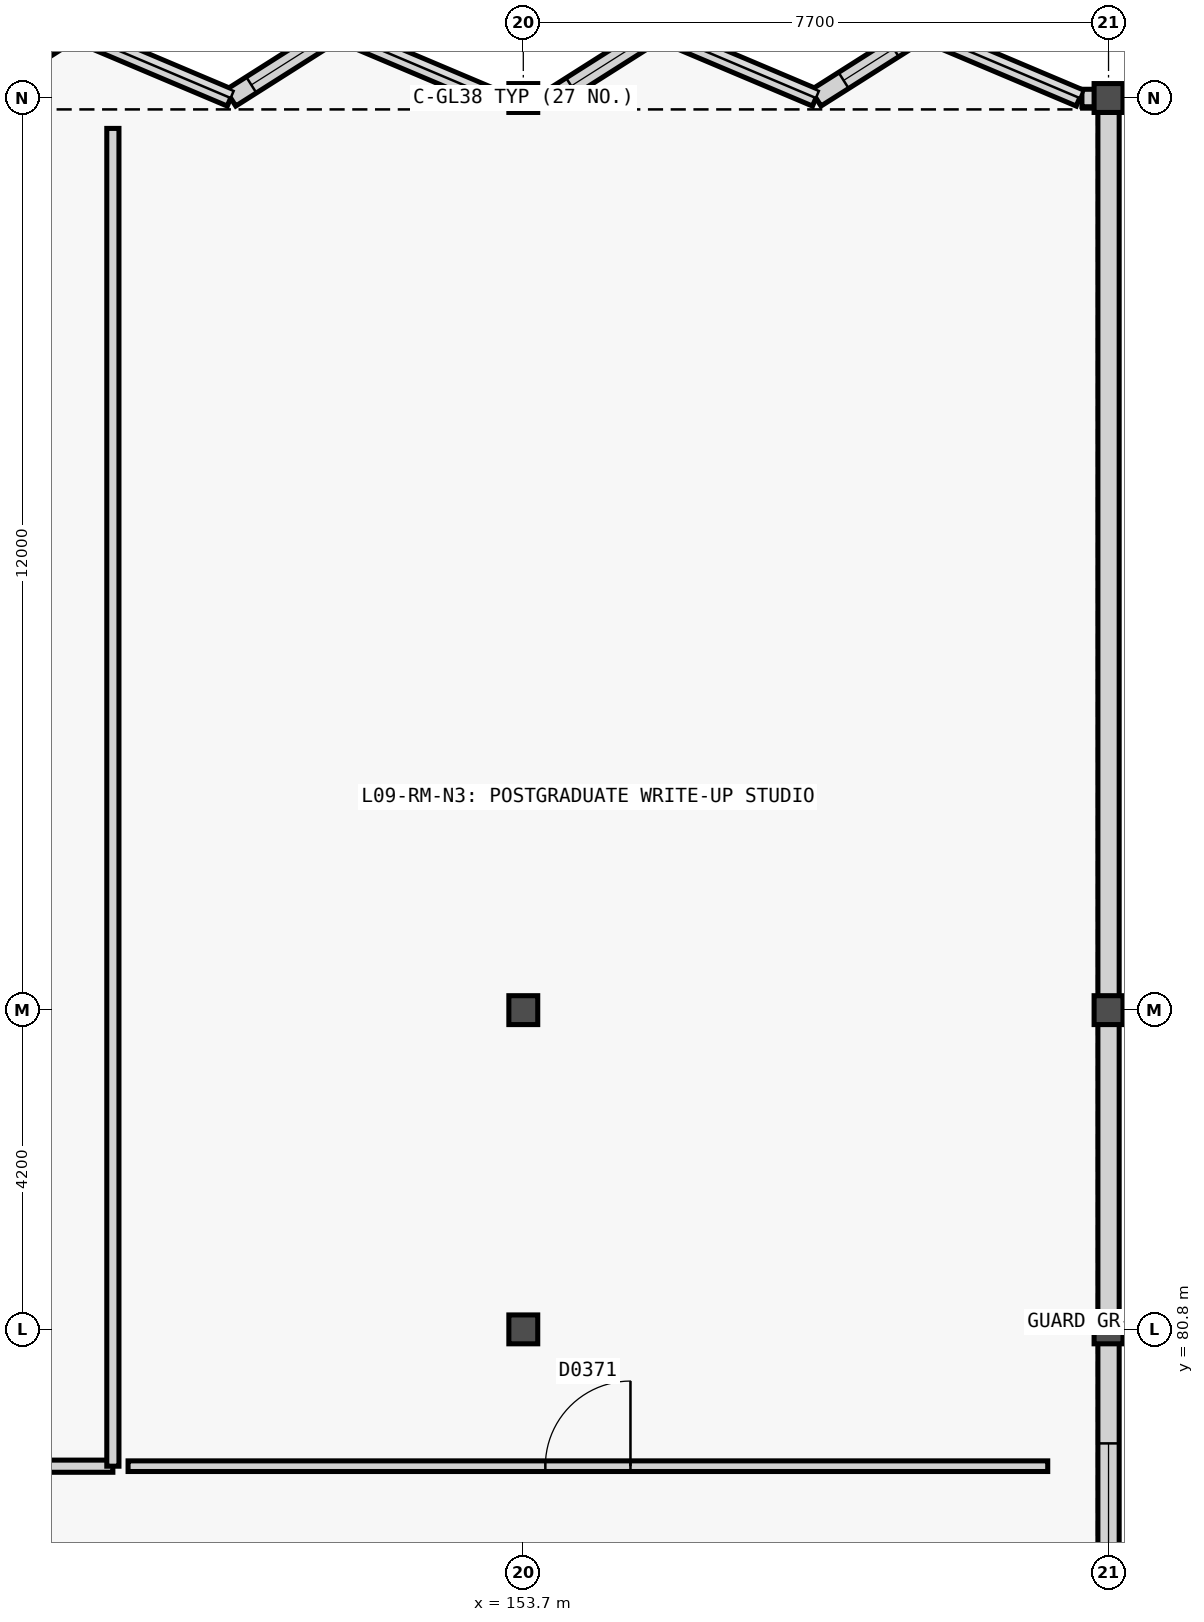
"""IFC4 building model, lengths in metres.
Left out: names, types, materials, properties, quantities, classifications, styles, units other than length and angle.
Written with IfcOpenShell. Run it as: python <this file> out.ifc"""

import sys

from ifc_helpers import new_model, si_unit, direction, frame, frame_2d, origin, origin_2d, place, context, subcontext, project, spatial, rectangle, extrude, element, fill, save


model = new_model("IFC4")
c1 = context("Model", 3, precision=1e-05, world=origin(), true_north=direction((0.0, 1.0)))
c2 = subcontext(c1, "Body", "Model", "MODEL_VIEW")
j1 = project(units=[si_unit("LENGTHUNIT", "METRE"), si_unit("PLANEANGLEUNIT", "RADIAN")], contexts=[c1])
p1 = place(None, origin())
s1 = spatial("IfcSite", under=j1, at=p1, CompositionType="ELEMENT")
p2 = place(p1, origin())
s2 = spatial("IfcBuilding", under=s1, at=p2, CompositionType="ELEMENT")
p3 = place(p2, frame((0.0, 0.0, 36.0)))
s3 = spatial("IfcBuildingStorey", under=s2, at=p3, CompositionType="ELEMENT", Elevation=36.0)
for number, where, z_axis, x_axis in (
    (1, (153.7, 80.8, 0.0), (0.0, 0.0, 1.0), (1.0, 0.0, 0.0)),
    (2, (153.7, 85.0, 0.0), (0.0, 0.0, 1.0), (1.0, 0.0, 0.0)),
    (3, (153.7, 97.0, 0.0), (0.0, 0.0, 1.0), (1.0, 0.0, 0.0)),
    (4, (161.4, 80.8, 0.0), (0.0, 0.0, 1.0), (1.0, 0.0, 0.0)),
    (5, (161.4, 85.0, 0.0), (0.0, 0.0, 1.0), (1.0, 0.0, 0.0)),
    (6, (161.4, 97.0, 0.0), (0.0, 0.0, 1.0), (1.0, 0.0, 0.0)),
):
    element("IfcColumn", number, at=place(p3, frame(where, z_axis=z_axis, x_axis=x_axis)), inside=s3, PredefinedType="COLUMN", context=c2, shape_type="SweptSolid", body=[
        extrude(rectangle(XDim=0.38, YDim=0.38, at=origin_2d()), origin(), (0.0, 0.0, 1.0), 3.6),
    ])
p4 = place(p3, frame((161.4, 96.812, 0.0), z_axis=(0.0, 0.0, 1.0), x_axis=(0.0, -1.0, 0.0)))
e7 = element("IfcWall", 7, at=p4, inside=s3, PredefinedType="SOLIDWALL", context=c2, shape_type="SweptSolid", body=[
    extrude(rectangle(XDim=32.624, YDim=0.28, at=frame_2d((16.312, 0.0))), origin(), (0.0, 0.0, 1.0), 2.8),
])
p5 = place(p4, frame((17.512, 0.0, 0.82)))
e8 = element("IfcOpeningElement", 8, at=p5, cuts=e7, PredefinedType="OPENING", context=c2, shape_type="SweptSolid", body=[
    extrude(rectangle(XDim=4.4, YDim=1.65, at=frame_2d((2.2, 0.825))), frame((0.0, 0.15, 0.0), z_axis=(0.0, -1.0, 0.0), x_axis=(1.0, 0.0, 0.0)), (0.0, 0.0, 1.0), 0.3),
])
p6 = place(p3, frame((153.35, 97.0, 0.0), z_axis=(0.0, 0.0, 1.0), x_axis=(1.0, 0.0, 0.0)))
e9 = element("IfcWall", 9, at=p6, inside=s3, PredefinedType="SOLIDWALL", context=c2, shape_type="SweptSolid", body=[
    extrude(rectangle(XDim=0.35, YDim=0.23, at=frame_2d((0.175, 0.0))), origin(), (0.0, 0.0, 1.0), 3.36),
])
p7 = place(p3, frame((153.7, 97.0, 0.0), z_axis=(0.0, 0.0, 1.0), x_axis=(1.0, 0.0, 0.0)))
e10 = element("IfcWall", 10, at=p7, inside=s3, PredefinedType="SOLIDWALL", context=c2, shape_type="SweptSolid", body=[
    extrude(rectangle(XDim=0.35, YDim=0.23, at=frame_2d((0.175, 0.0))), origin(), (0.0, 0.0, 1.0), 3.36),
])
p8 = place(p3, frame((161.05, 97.0, 0.0), z_axis=(0.0, 0.0, 1.0), x_axis=(1.0, 0.0, 0.0)))
e11 = element("IfcWall", 11, at=p8, inside=s3, PredefinedType="SOLIDWALL", context=c2, shape_type="SweptSolid", body=[
    extrude(rectangle(XDim=0.35, YDim=0.23, at=frame_2d((0.175, 0.0))), origin(), (0.0, 0.0, 1.0), 3.36),
])
p9 = place(p3, frame((146.38, 97.0, 0.0), z_axis=(0.0, 0.0, 1.0), x_axis=(0.844626536799, 0.535355968805, 0.0)))
e12 = element("IfcWall", 12, at=p9, inside=s3, PredefinedType="SOLIDWALL", context=c2, shape_type="SweptSolid", body=[
    extrude(rectangle(XDim=1.644, YDim=0.25, at=frame_2d((0.822, 0.0))), origin(), (0.0, 0.0, 1.0), 3.36),
])
p10 = place(p9, frame((0.347, 0.0, 0.82)))
e13 = element("IfcOpeningElement", 13, at=p10, cuts=e12, PredefinedType="OPENING", context=c2, shape_type="SweptSolid", body=[
    extrude(rectangle(XDim=0.95, YDim=1.5, at=frame_2d((0.475, 0.75))), frame((0.0, 0.135, 0.0), z_axis=(0.0, -1.0, 0.0), x_axis=(1.0, 0.0, 0.0)), (0.0, 0.0, 1.0), 0.27),
])
p11 = place(p3, frame((147.768, 97.88, 0.0), z_axis=(0.0, 0.0, 1.0), x_axis=(0.921122216024, -0.389273506866, 0.0)))
e14 = element("IfcWall", 14, at=p11, inside=s3, PredefinedType="SOLIDWALL", context=c2, shape_type="SweptSolid", body=[
    extrude(rectangle(XDim=2.26, YDim=0.23, at=frame_2d((1.13, 0.0))), origin(), (0.0, 0.0, 1.0), 3.36),
])
p12 = place(p3, frame((149.85, 97.0, 0.0), z_axis=(0.0, 0.0, 1.0), x_axis=(0.844583954912, 0.535423143976, 0.0)))
e15 = element("IfcWall", 15, at=p12, inside=s3, PredefinedType="SOLIDWALL", context=c2, shape_type="SweptSolid", body=[
    extrude(rectangle(XDim=1.643, YDim=0.25, at=frame_2d((0.822, 0.0))), origin(), (0.0, 0.0, 1.0), 3.36),
])
p13 = place(p12, frame((0.322, 0.0, 0.82)))
e16 = element("IfcOpeningElement", 16, at=p13, cuts=e15, PredefinedType="OPENING", context=c2, shape_type="SweptSolid", body=[
    extrude(rectangle(XDim=1.0, YDim=1.35, at=frame_2d((0.5, 0.675))), frame((0.0, 0.135, 0.0), z_axis=(0.0, -1.0, 0.0), x_axis=(1.0, 0.0, 0.0)), (0.0, 0.0, 1.0), 0.27),
])
p14 = place(p3, frame((151.238, 97.88, 0.0), z_axis=(0.0, 0.0, 1.0), x_axis=(0.921122216024, -0.389273506866, 0.0)))
e17 = element("IfcWall", 17, at=p14, inside=s3, PredefinedType="SOLIDWALL", context=c2, shape_type="SweptSolid", body=[
    extrude(rectangle(XDim=2.26, YDim=0.23, at=frame_2d((1.13, 0.0))), origin(), (0.0, 0.0, 1.0), 3.36),
])
p15 = place(p3, frame((154.08, 97.0, 0.0), z_axis=(0.0, 0.0, 1.0), x_axis=(0.844583954912, 0.535423143976, 0.0)))
e18 = element("IfcWall", 18, at=p15, inside=s3, PredefinedType="SOLIDWALL", context=c2, shape_type="SweptSolid", body=[
    extrude(rectangle(XDim=1.643, YDim=0.25, at=frame_2d((0.822, 0.0))), origin(), (0.0, 0.0, 1.0), 3.36),
])
p16 = place(p15, frame((0.297, 0.0, 0.82)))
e19 = element("IfcOpeningElement", 19, at=p16, cuts=e18, PredefinedType="OPENING", context=c2, shape_type="SweptSolid", body=[
    extrude(rectangle(XDim=1.05, YDim=1.4, at=frame_2d((0.525, 0.7))), frame((0.0, 0.135, 0.0), z_axis=(0.0, -1.0, 0.0), x_axis=(1.0, 0.0, 0.0)), (0.0, 0.0, 1.0), 0.27),
])
p17 = place(p3, frame((155.468, 97.88, 0.0), z_axis=(0.0, 0.0, 1.0), x_axis=(0.921122216024, -0.389273506866, 0.0)))
e20 = element("IfcWall", 20, at=p17, inside=s3, PredefinedType="SOLIDWALL", context=c2, shape_type="SweptSolid", body=[
    extrude(rectangle(XDim=2.26, YDim=0.23, at=frame_2d((1.13, 0.0))), origin(), (0.0, 0.0, 1.0), 3.36),
])
p18 = place(p3, frame((157.55, 97.0, 0.0), z_axis=(0.0, 0.0, 1.0), x_axis=(0.844583954912, 0.535423143976, 0.0)))
e21 = element("IfcWall", 21, at=p18, inside=s3, PredefinedType="SOLIDWALL", context=c2, shape_type="SweptSolid", body=[
    extrude(rectangle(XDim=1.643, YDim=0.25, at=frame_2d((0.822, 0.0))), origin(), (0.0, 0.0, 1.0), 3.36),
])
p19 = place(p18, frame((0.432, 0.0, 0.82)))
e22 = element("IfcOpeningElement", 22, at=p19, cuts=e21, PredefinedType="OPENING", context=c2, shape_type="SweptSolid", body=[
    extrude(rectangle(XDim=0.78, YDim=1.3, at=frame_2d((0.39, 0.65))), frame((0.0, 0.135, 0.0), z_axis=(0.0, -1.0, 0.0), x_axis=(1.0, 0.0, 0.0)), (0.0, 0.0, 1.0), 0.27),
])
p20 = place(p3, frame((158.938, 97.88, 0.0), z_axis=(0.0, 0.0, 1.0), x_axis=(0.921122216024, -0.389273506866, 0.0)))
e23 = element("IfcWall", 23, at=p20, inside=s3, PredefinedType="SOLIDWALL", context=c2, shape_type="SweptSolid", body=[
    extrude(rectangle(XDim=2.26, YDim=0.23, at=frame_2d((1.13, 0.0))), origin(), (0.0, 0.0, 1.0), 3.36),
])
p21 = place(p3, frame((135.5, 79.0, 0.0), z_axis=(0.0, 0.0, 1.0), x_axis=(1.0, 0.0, 0.0)))
e24 = element("IfcWall", 24, at=p21, inside=s3, PredefinedType="PARTITIONING", context=c2, shape_type="SweptSolid", body=[
    extrude(rectangle(XDim=12.8, YDim=0.16, at=frame_2d((6.4, 0.0))), origin(), (0.0, 0.0, 1.0), 3.34),
])
p22 = place(p21, frame((5.6, 0.0, 0.0)))
e25 = element("IfcOpeningElement", 25, at=p22, cuts=e24, PredefinedType="OPENING", context=c2, shape_type="SweptSolid", body=[
    extrude(rectangle(XDim=1.6, YDim=2.2, at=frame_2d((0.8, 1.1))), frame((0.0, 0.09, 0.0), z_axis=(0.0, -1.0, 0.0), x_axis=(1.0, 0.0, 0.0)), (0.0, 0.0, 1.0), 0.18),
])
p23 = place(p3, frame((148.3, 79.0, 0.0), z_axis=(0.0, 0.0, 1.0), x_axis=(0.0, 1.0, 0.0)))
e26 = element("IfcWall", 26, at=p23, inside=s3, PredefinedType="PARTITIONING", context=c2, shape_type="SweptSolid", body=[
    extrude(rectangle(XDim=17.6, YDim=0.16, at=frame_2d((8.8, 0.0))), origin(), (0.0, 0.0, 1.0), 3.34),
])
p24 = place(p3, frame((148.5, 79.0, 0.0), z_axis=(0.0, 0.0, 1.0), x_axis=(1.0, 0.0, 0.0)))
e27 = element("IfcWall", 27, at=p24, inside=s3, PredefinedType="PARTITIONING", context=c2, shape_type="SweptSolid", body=[
    extrude(rectangle(XDim=12.1, YDim=0.14, at=frame_2d((6.05, 0.0))), origin(), (0.0, 0.0, 1.0), 3.34),
])
p25 = place(p24, frame((5.49, 0.0, 0.0)))
e28 = element("IfcOpeningElement", 28, at=p25, cuts=e27, PredefinedType="OPENING", context=c2, shape_type="SweptSolid", body=[
    extrude(rectangle(XDim=1.12, YDim=2.15, at=frame_2d((0.56, 1.075))), frame((0.0, 0.08, 0.0), z_axis=(0.0, -1.0, 0.0), x_axis=(1.0, 0.0, 0.0)), (0.0, 0.0, 1.0), 0.16),
])
p26 = place(p5, origin())
e29 = element("IfcWindow", 29, at=p26, inside=s3, PartitioningType="SINGLE_PANEL", PredefinedType="WINDOW", context=c2, shape_type="SweptSolid", body=[
    extrude(rectangle(XDim=4.4, YDim=1.65, at=frame_2d((2.2, 0.825))), frame((0.0, 0.03, 0.0), z_axis=(0.0, -1.0, 0.0), x_axis=(1.0, 0.0, 0.0)), (0.0, 0.0, 1.0), 0.06),
])
fill(e8, e29)
p27 = place(p13, origin())
e30 = element("IfcWindow", 30, at=p27, inside=s3, PartitioningType="SINGLE_PANEL", PredefinedType="WINDOW", context=c2, shape_type="SweptSolid", body=[
    extrude(rectangle(XDim=1.0, YDim=1.35, at=frame_2d((0.5, 0.675))), frame((0.0, 0.03, 0.0), z_axis=(0.0, -1.0, 0.0), x_axis=(1.0, 0.0, 0.0)), (0.0, 0.0, 1.0), 0.06),
])
fill(e16, e30)
p28 = place(p16, origin())
e31 = element("IfcWindow", 31, at=p28, inside=s3, PartitioningType="SINGLE_PANEL", PredefinedType="WINDOW", context=c2, shape_type="SweptSolid", body=[
    extrude(rectangle(XDim=1.05, YDim=1.4, at=frame_2d((0.525, 0.7))), frame((0.0, 0.03, 0.0), z_axis=(0.0, -1.0, 0.0), x_axis=(1.0, 0.0, 0.0)), (0.0, 0.0, 1.0), 0.06),
])
fill(e19, e31)
p29 = place(p19, origin())
e32 = element("IfcWindow", 32, at=p29, inside=s3, PartitioningType="SINGLE_PANEL", PredefinedType="WINDOW", context=c2, shape_type="SweptSolid", body=[
    extrude(rectangle(XDim=0.78, YDim=1.3, at=frame_2d((0.39, 0.65))), frame((0.0, 0.03, 0.0), z_axis=(0.0, -1.0, 0.0), x_axis=(1.0, 0.0, 0.0)), (0.0, 0.0, 1.0), 0.06),
])
fill(e22, e32)
p30 = place(p25, origin())
e33 = element("IfcDoor", 33, at=p30, inside=s3, OperationType="SINGLE_SWING_RIGHT", PredefinedType="DOOR", context=c2, shape_type="SweptSolid", body=[
    extrude(rectangle(XDim=1.12, YDim=2.15, at=frame_2d((0.56, 1.075))), frame((0.0, 0.025, 0.0), z_axis=(0.0, -1.0, 0.0), x_axis=(1.0, 0.0, 0.0)), (0.0, 0.0, 1.0), 0.05),
])
fill(e28, e33)
save(model, sys.argv[1])
